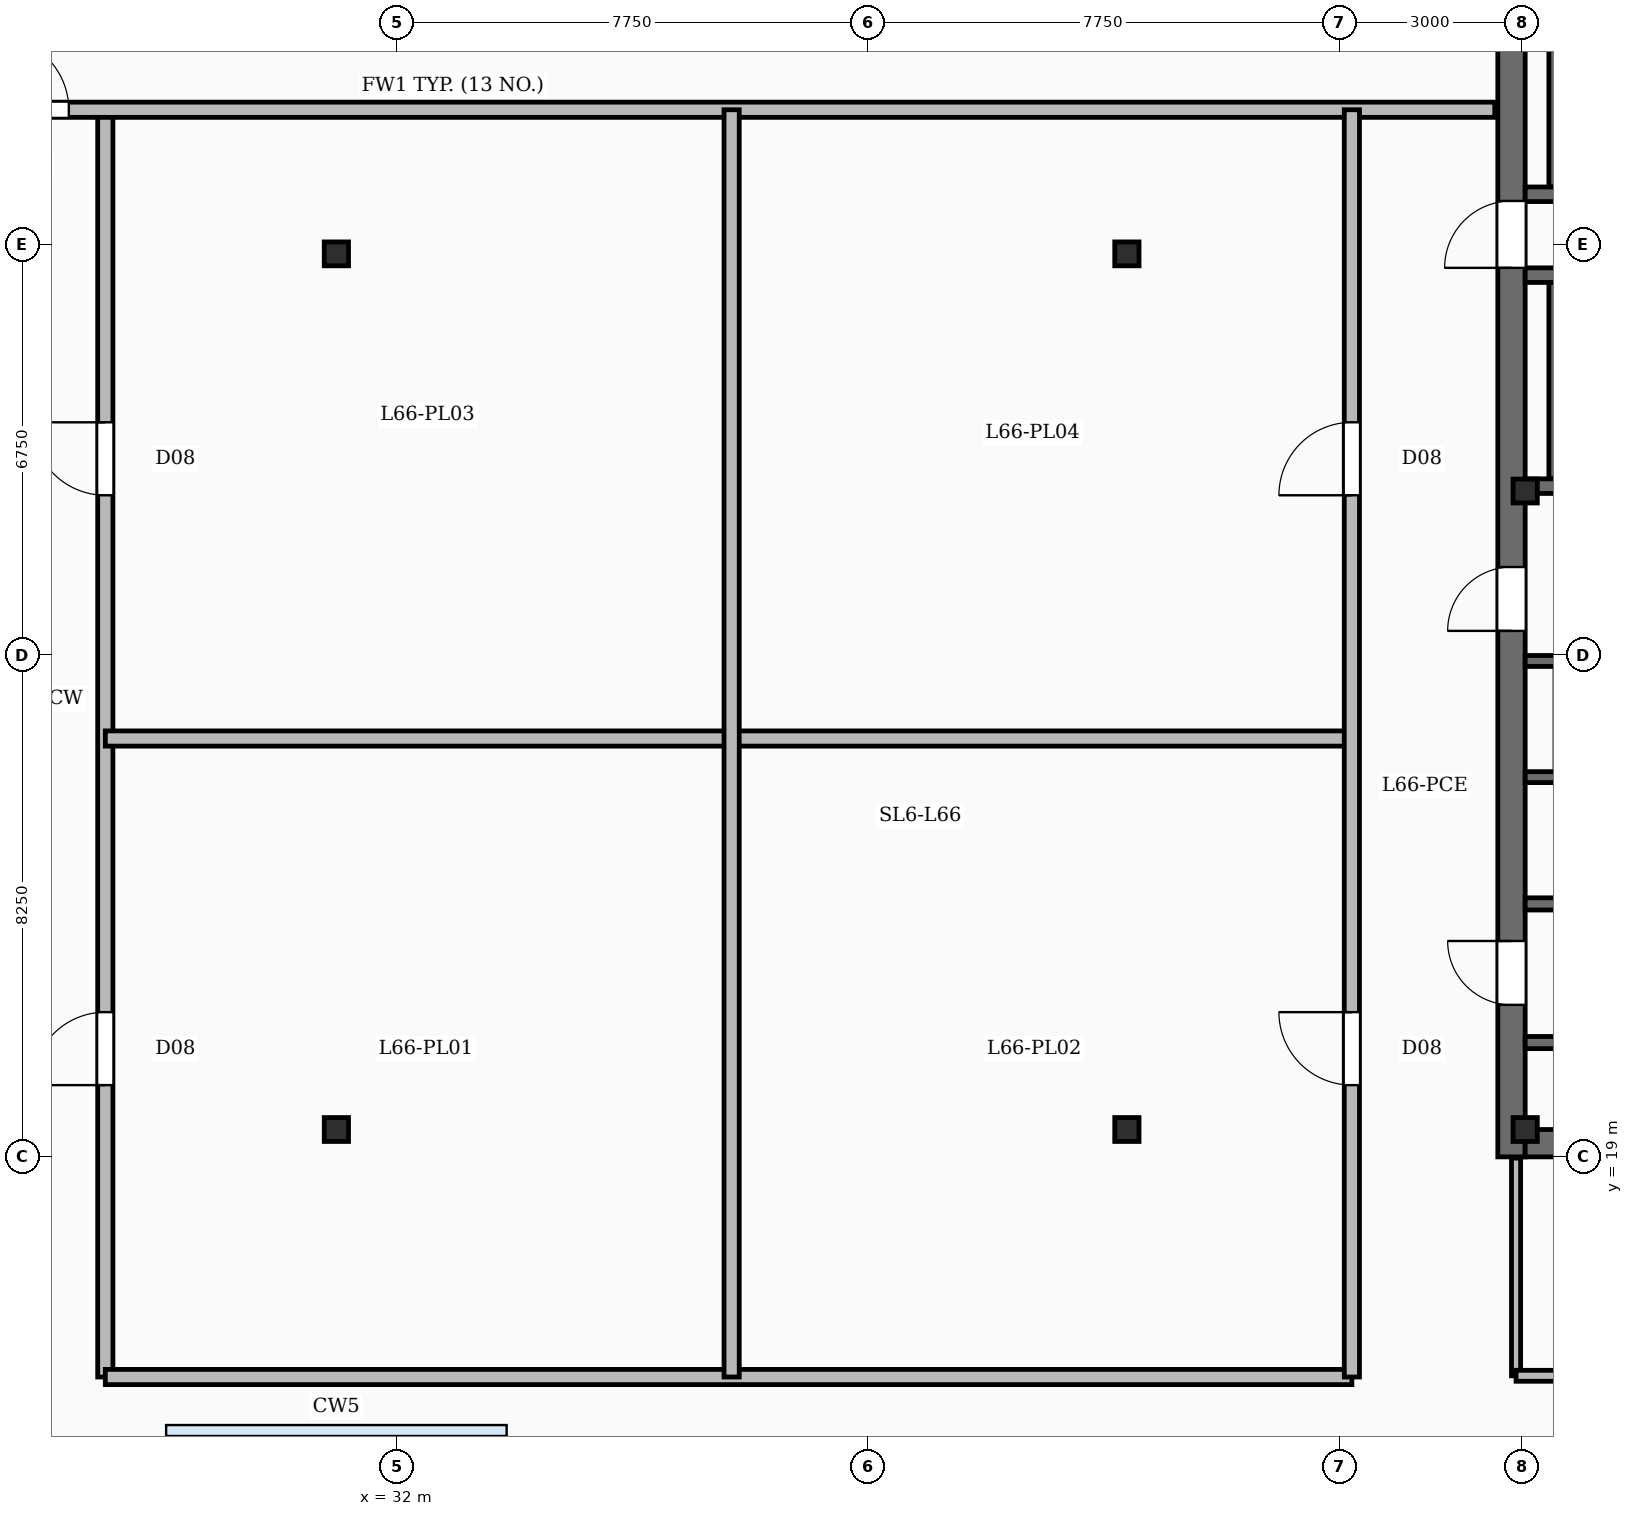
"""IFC4 building model, lengths in metres.
Left out: names, types, materials, properties, quantities, classifications, styles, units other than length and angle.
Written with IfcOpenShell. Run it as: python <this file> out.ifc"""

import sys

from ifc_helpers import new_model, si_unit, direction, frame, frame_2d, origin, origin_2d, place, context, subcontext, project, spatial, rectangle, i_section, extrude, element, fill, save


model = new_model("IFC4")
c1 = context("Model", 3, precision=1e-05, world=origin(), true_north=direction((0.0, 1.0)))
c2 = subcontext(c1, "Body", "Model", "MODEL_VIEW")
j1 = project(units=[si_unit("LENGTHUNIT", "METRE"), si_unit("PLANEANGLEUNIT", "RADIAN")], contexts=[c1])
p1 = place(None, origin())
s1 = spatial("IfcSite", under=j1, at=p1, CompositionType="ELEMENT")
p2 = place(p1, origin())
s2 = spatial("IfcBuilding", under=s1, at=p2, CompositionType="ELEMENT")
p3 = place(p2, frame((0.0, 0.0, 269.7)))
s3 = spatial("IfcBuildingStorey", under=s2, at=p3, CompositionType="ELEMENT", Elevation=269.7)
p4 = place(p3, frame((50.325, 19.0, -0.42), z_axis=(0.0, 0.0, 1.0), x_axis=(0.0, 1.0, 0.0)))
e1 = element("IfcWall", 1, at=p4, inside=s3, PredefinedType="SHEAR", context=c2, shape_type="SweptSolid", body=[
    extrude(rectangle(XDim=20.8, YDim=0.45, at=frame_2d((10.4, 0.0))), origin(), (0.0, 0.0, 1.0), 5.17),
])
p5 = place(p4, frame((2.5, 0.0, 0.42)))
e2 = element("IfcOpeningElement", 2, at=p5, cuts=e1, PredefinedType="OPENING", context=c2, shape_type="SweptSolid", body=[
    extrude(rectangle(XDim=1.05, YDim=2.15, at=frame_2d((0.525, 1.075))), frame((0.0, 0.235, 0.0), z_axis=(0.0, -1.0, 0.0), x_axis=(1.0, 0.0, 0.0)), (0.0, 0.0, 1.0), 0.47),
])
p6 = place(p4, frame((8.65, 0.0, 0.42)))
e3 = element("IfcOpeningElement", 3, at=p6, cuts=e1, PredefinedType="OPENING", context=c2, shape_type="SweptSolid", body=[
    extrude(rectangle(XDim=1.05, YDim=2.15, at=frame_2d((0.525, 1.075))), frame((0.0, 0.235, 0.0), z_axis=(0.0, -1.0, 0.0), x_axis=(1.0, 0.0, 0.0)), (0.0, 0.0, 1.0), 0.47),
])
p7 = place(p4, frame((14.62, 0.0, 0.42)))
e4 = element("IfcOpeningElement", 4, at=p7, cuts=e1, PredefinedType="OPENING", context=c2, shape_type="SweptSolid", body=[
    extrude(rectangle(XDim=1.1, YDim=2.15, at=frame_2d((0.55, 1.075))), frame((0.0, 0.235, 0.0), z_axis=(0.0, -1.0, 0.0), x_axis=(1.0, 0.0, 0.0)), (0.0, 0.0, 1.0), 0.47),
])
p8 = place(p3, frame((50.55, 19.225, -0.42), z_axis=(0.0, 0.0, 1.0), x_axis=(1.0, 0.0, 0.0)))
e5 = element("IfcWall", 5, at=p8, inside=s3, PredefinedType="SHEAR", context=c2, shape_type="SweptSolid", body=[
    extrude(rectangle(XDim=9.8, YDim=0.45, at=frame_2d((4.9, 0.0))), origin(), (0.0, 0.0, 1.0), 5.17),
])
for number, where, z_axis, x_axis in (
    (6, (50.55, 19.45, -0.42), (0.0, 0.0, 1.0), (1.0, 0.0, 0.0)),
    (7, (50.55, 29.95, -0.42), (0.0, 0.0, 1.0), (1.0, 0.0, 0.0)),
    (8, (31.0, 19.45, -0.42), (0.0, 0.0, 1.0), (1.0, 0.0, 0.0)),
    (9, (44.0, 19.45, -0.42), (0.0, 0.0, 1.0), (1.0, 0.0, 0.0)),
    (10, (31.0, 33.85, -0.42), (0.0, 0.0, 1.0), (1.0, 0.0, 0.0)),
    (11, (44.0, 33.85, -0.42), (0.0, 0.0, 1.0), (1.0, 0.0, 0.0)),
):
    element("IfcColumn", number, at=place(p3, frame(where, z_axis=z_axis, x_axis=x_axis)), inside=s3, PredefinedType="COLUMN", context=c2, shape_type="SweptSolid", body=[
        extrude(i_section(OverallWidth=0.399, OverallDepth=0.393, WebThickness=0.023, FlangeThickness=0.037, FilletRadius=0.02, at=origin_2d()), origin(), (0.0, 0.0, 1.0), 5.17),
    ])
p9 = place(p3, frame((60.35, 30.03, 0.0), z_axis=(0.0, 0.0, 1.0), x_axis=(-1.0, 0.0, 0.0)))
e12 = element("IfcWall", 12, at=p9, inside=s3, PredefinedType="SOLIDWALL", context=c2, shape_type="SweptSolid", body=[
    extrude(rectangle(XDim=9.8, YDim=0.24, at=frame_2d((4.9, 0.0))), origin(), (0.0, 0.0, 1.0), 4.75),
])
p10 = place(p9, frame((7.83, 0.0, 0.0)))
e13 = element("IfcOpeningElement", 13, at=p10, cuts=e12, PredefinedType="OPENING", context=c2, shape_type="SweptSolid", body=[
    extrude(rectangle(XDim=1.1, YDim=2.15, at=frame_2d((0.55, 1.075))), frame((0.0, 0.13, 0.0), z_axis=(0.0, -1.0, 0.0), x_axis=(1.0, 0.0, 0.0)), (0.0, 0.0, 1.0), 0.26),
])
p11 = place(p3, frame((50.55, 33.5, 0.0), z_axis=(0.0, 0.0, 1.0), x_axis=(1.0, 0.0, 0.0)))
e14 = element("IfcWall", 14, at=p11, inside=s3, PredefinedType="SOLIDWALL", context=c2, shape_type="SweptSolid", body=[
    extrude(rectangle(XDim=9.8, YDim=0.24, at=frame_2d((4.9, 0.0))), origin(), (0.0, 0.0, 1.0), 4.75),
])
p12 = place(p3, frame((51.06, 30.15, 0.0), z_axis=(0.0, 0.0, 1.0), x_axis=(0.0, 1.0, 0.0)))
e15 = element("IfcWall", 15, at=p12, inside=s3, PredefinedType="SOLIDWALL", context=c2, shape_type="SweptSolid", body=[
    extrude(rectangle(XDim=3.23, YDim=0.24, at=frame_2d((1.615, 0.0))), origin(), (0.0, 0.0, 1.0), 4.75),
])
p13 = place(p3, frame((60.35, 34.83, 0.0), z_axis=(0.0, 0.0, 1.0), x_axis=(-1.0, 0.0, 0.0)))
e16 = element("IfcWall", 16, at=p13, inside=s3, PredefinedType="SOLIDWALL", context=c2, shape_type="SweptSolid", body=[
    extrude(rectangle(XDim=9.8, YDim=0.24, at=frame_2d((4.9, 0.0))), origin(), (0.0, 0.0, 1.0), 4.75),
])
p14 = place(p13, frame((7.87, 0.0, 0.0)))
e17 = element("IfcOpeningElement", 17, at=p14, cuts=e16, PredefinedType="OPENING", context=c2, shape_type="SweptSolid", body=[
    extrude(rectangle(XDim=1.1, YDim=2.15, at=frame_2d((0.55, 1.075))), frame((0.0, 0.13, 0.0), z_axis=(0.0, -1.0, 0.0), x_axis=(1.0, 0.0, 0.0)), (0.0, 0.0, 1.0), 0.26),
])
p15 = place(p3, frame((51.06, 34.95, 0.0), z_axis=(0.0, 0.0, 1.0), x_axis=(0.0, 1.0, 0.0)))
e18 = element("IfcWall", 18, at=p15, inside=s3, PredefinedType="SOLIDWALL", context=c2, shape_type="SweptSolid", body=[
    extrude(rectangle(XDim=3.15, YDim=0.24, at=frame_2d((1.575, 0.0))), origin(), (0.0, 0.0, 1.0), 4.75),
])
p16 = place(p3, frame((50.55, 27.155, 0.0), z_axis=(0.0, 0.0, 1.0), x_axis=(1.0, 0.0, 0.0)))
e19 = element("IfcWall", 19, at=p16, inside=s3, PredefinedType="SOLIDWALL", context=c2, shape_type="SweptSolid", body=[
    extrude(rectangle(XDim=3.315, YDim=0.18, at=frame_2d((1.657, 0.0))), origin(), (0.0, 0.0, 1.0), 4.75),
])
p17 = place(p16, frame((1.235, 0.0, 0.0)))
e20 = element("IfcOpeningElement", 20, at=p17, cuts=e19, PredefinedType="OPENING", context=c2, shape_type="SweptSolid", body=[
    extrude(rectangle(XDim=1.35, YDim=2.3, at=frame_2d((0.675, 1.15))), frame((0.0, 0.1, 0.0), z_axis=(0.0, -1.0, 0.0), x_axis=(1.0, 0.0, 0.0)), (0.0, 0.0, 1.0), 0.2),
])
p18 = place(p3, frame((50.55, 25.245, 0.0), z_axis=(0.0, 0.0, 1.0), x_axis=(1.0, 0.0, 0.0)))
e21 = element("IfcWall", 21, at=p18, inside=s3, PredefinedType="SOLIDWALL", context=c2, shape_type="SweptSolid", body=[
    extrude(rectangle(XDim=3.315, YDim=0.18, at=frame_2d((1.657, 0.0))), origin(), (0.0, 0.0, 1.0), 4.75),
])
p19 = place(p3, frame((50.55, 20.88, 0.0), z_axis=(0.0, 0.0, 1.0), x_axis=(1.0, 0.0, 0.0)))
e22 = element("IfcWall", 22, at=p19, inside=s3, PredefinedType="SOLIDWALL", context=c2, shape_type="SweptSolid", body=[
    extrude(rectangle(XDim=9.8, YDim=0.2, at=frame_2d((4.9, 0.0))), origin(), (0.0, 0.0, 1.0), 3.81),
])
p20 = place(p19, frame((1.4, 0.0, 0.0)))
e23 = element("IfcOpeningElement", 23, at=p20, cuts=e22, PredefinedType="OPENING", context=c2, shape_type="SweptSolid", body=[
    extrude(rectangle(XDim=1.05, YDim=2.15, at=frame_2d((0.525, 1.075))), frame((0.0, 0.11, 0.0), z_axis=(0.0, -1.0, 0.0), x_axis=(1.0, 0.0, 0.0)), (0.0, 0.0, 1.0), 0.22),
])
p21 = place(p19, frame((5.5, 0.0, 0.0)))
e24 = element("IfcOpeningElement", 24, at=p21, cuts=e22, PredefinedType="OPENING", context=c2, shape_type="SweptSolid", body=[
    extrude(rectangle(XDim=1.05, YDim=2.15, at=frame_2d((0.525, 1.075))), frame((0.0, 0.11, 0.0), z_axis=(0.0, -1.0, 0.0), x_axis=(1.0, 0.0, 0.0)), (0.0, 0.0, 1.0), 0.22),
])
p22 = place(p3, frame((50.55, 23.16, 0.0), z_axis=(0.0, 0.0, 1.0), x_axis=(1.0, 0.0, 0.0)))
e25 = element("IfcWall", 25, at=p22, inside=s3, PredefinedType="SOLIDWALL", context=c2, shape_type="SweptSolid", body=[
    extrude(rectangle(XDim=3.33, YDim=0.2, at=frame_2d((1.665, 0.0))), origin(), (0.0, 0.0, 1.0), 3.81),
])
p23 = place(p22, frame((0.55, 0.0, 0.0)))
e26 = element("IfcOpeningElement", 26, at=p23, cuts=e25, PredefinedType="OPENING", context=c2, shape_type="SweptSolid", body=[
    extrude(rectangle(XDim=0.86, YDim=2.05, at=frame_2d((0.43, 1.025))), frame((0.0, 0.11, 0.0), z_axis=(0.0, -1.0, 0.0), x_axis=(1.0, 0.0, 0.0)), (0.0, 0.0, 1.0), 0.22),
])
p24 = place(p3, frame((50.4, 15.4, 0.0), z_axis=(0.0, 0.0, 1.0), x_axis=(1.0, 0.0, 0.0)))
e27 = element("IfcWall", 27, at=p24, inside=s3, PredefinedType="SOLIDWALL", context=c2, shape_type="SweptSolid", body=[
    extrude(rectangle(XDim=10.0, YDim=0.18, at=frame_2d((5.0, 0.0))), origin(), (0.0, 0.0, 1.0), 3.81),
])
p25 = place(p24, frame((1.19, 0.0, 0.0)))
e28 = element("IfcOpeningElement", 28, at=p25, cuts=e27, PredefinedType="OPENING", context=c2, shape_type="SweptSolid", body=[
    extrude(rectangle(XDim=0.92, YDim=2.1, at=frame_2d((0.46, 1.05))), frame((0.0, 0.1, 0.0), z_axis=(0.0, -1.0, 0.0), x_axis=(1.0, 0.0, 0.0)), (0.0, 0.0, 1.0), 0.2),
])
p26 = place(p24, frame((4.54, 0.0, 0.0)))
e29 = element("IfcOpeningElement", 29, at=p26, cuts=e27, PredefinedType="OPENING", context=c2, shape_type="SweptSolid", body=[
    extrude(rectangle(XDim=0.92, YDim=2.1, at=frame_2d((0.46, 1.05))), frame((0.0, 0.1, 0.0), z_axis=(0.0, -1.0, 0.0), x_axis=(1.0, 0.0, 0.0)), (0.0, 0.0, 1.0), 0.2),
])
p27 = place(p24, frame((7.92, 0.0, 0.0)))
e30 = element("IfcOpeningElement", 30, at=p27, cuts=e27, PredefinedType="OPENING", context=c2, shape_type="SweptSolid", body=[
    extrude(rectangle(XDim=0.86, YDim=2.05, at=frame_2d((0.43, 1.025))), frame((0.0, 0.1, 0.0), z_axis=(0.0, -1.0, 0.0), x_axis=(1.0, 0.0, 0.0)), (0.0, 0.0, 1.0), 0.2),
])
p28 = place(p3, frame((50.4, 15.4, 0.0), z_axis=(0.0, 0.0, 1.0), x_axis=(0.0, 1.0, 0.0)))
e31 = element("IfcWall", 31, at=p28, inside=s3, PredefinedType="PARTITIONING", context=c2, shape_type="SweptSolid", body=[
    extrude(rectangle(XDim=3.58, YDim=0.15, at=frame_2d((1.79, 0.0))), origin(), (0.0, 0.0, 1.0), 2.8),
])
p29 = place(p3, frame((37.5, 15.38, 0.0), z_axis=(0.0, 0.0, 1.0), x_axis=(0.0, 1.0, 0.0)))
e32 = element("IfcWall", 32, at=p29, inside=s3, PredefinedType="SOLIDWALL", context=c2, shape_type="SweptSolid", body=[
    extrude(rectangle(XDim=20.84, YDim=0.25, at=frame_2d((10.42, 0.0))), origin(), (0.0, 0.0, 1.0), 3.81),
])
for number, where, z_axis, x_axis in (
    (33, (27.2, 25.88, 0.0), (0.0, 0.0, 1.0), (1.0, 0.0, 0.0)),
    (34, (27.2, 15.38, 0.0), (0.0, 0.0, 1.0), (1.0, 0.0, 0.0)),
):
    element("IfcWall", number, at=place(p3, frame(where, z_axis=z_axis, x_axis=x_axis)), inside=s3, PredefinedType="SOLIDWALL", context=c2, shape_type="SweptSolid", body=[
        extrude(rectangle(XDim=20.5, YDim=0.25, at=frame_2d((10.25, 0.0))), origin(), (0.0, 0.0, 1.0), 3.81),
    ])
p30 = place(p3, frame((24.85, 36.22, 0.0), z_axis=(0.0, 0.0, 1.0), x_axis=(1.0, 0.0, 0.0)))
e35 = element("IfcWall", 35, at=p30, inside=s3, PredefinedType="SOLIDWALL", context=c2, shape_type="SweptSolid", body=[
    extrude(rectangle(XDim=25.2, YDim=0.25, at=frame_2d((12.6, 0.0))), origin(), (0.0, 0.0, 1.0), 3.81),
])
p31 = place(p30, frame((0.55, 0.0, 0.0)))
e36 = element("IfcOpeningElement", 36, at=p31, cuts=e35, PredefinedType="OPENING", context=c2, shape_type="SweptSolid", body=[
    extrude(rectangle(XDim=1.2, YDim=2.2, at=frame_2d((0.6, 1.1))), frame((0.0, 0.135, 0.0), z_axis=(0.0, -1.0, 0.0), x_axis=(1.0, 0.0, 0.0)), (0.0, 0.0, 1.0), 0.27),
])
p32 = place(p3, frame((27.2, 15.38, 0.0), z_axis=(0.0, 0.0, 1.0), x_axis=(0.0, 1.0, 0.0)))
e37 = element("IfcWall", 37, at=p32, inside=s3, PredefinedType="SOLIDWALL", context=c2, shape_type="SweptSolid", body=[
    extrude(rectangle(XDim=20.84, YDim=0.25, at=frame_2d((10.42, 0.0))), origin(), (0.0, 0.0, 1.0), 3.81),
])
p33 = place(p32, frame((4.8, 0.0, 0.0)))
e38 = element("IfcOpeningElement", 38, at=p33, cuts=e37, PredefinedType="OPENING", context=c2, shape_type="SweptSolid", body=[
    extrude(rectangle(XDim=1.2, YDim=2.2, at=frame_2d((0.6, 1.1))), frame((0.0, 0.135, 0.0), z_axis=(0.0, -1.0, 0.0), x_axis=(1.0, 0.0, 0.0)), (0.0, 0.0, 1.0), 0.27),
])
p34 = place(p32, frame((14.5, 0.0, 0.0)))
e39 = element("IfcOpeningElement", 39, at=p34, cuts=e37, PredefinedType="OPENING", context=c2, shape_type="SweptSolid", body=[
    extrude(rectangle(XDim=1.2, YDim=2.2, at=frame_2d((0.6, 1.1))), frame((0.0, 0.135, 0.0), z_axis=(0.0, -1.0, 0.0), x_axis=(1.0, 0.0, 0.0)), (0.0, 0.0, 1.0), 0.27),
])
p35 = place(p3, frame((47.7, 15.38, 0.0), z_axis=(0.0, 0.0, 1.0), x_axis=(0.0, 1.0, 0.0)))
e40 = element("IfcWall", 40, at=p35, inside=s3, PredefinedType="SOLIDWALL", context=c2, shape_type="SweptSolid", body=[
    extrude(rectangle(XDim=20.84, YDim=0.25, at=frame_2d((10.42, 0.0))), origin(), (0.0, 0.0, 1.0), 3.81),
])
p36 = place(p35, frame((4.8, 0.0, 0.0)))
e41 = element("IfcOpeningElement", 41, at=p36, cuts=e40, PredefinedType="OPENING", context=c2, shape_type="SweptSolid", body=[
    extrude(rectangle(XDim=1.2, YDim=2.2, at=frame_2d((0.6, 1.1))), frame((0.0, 0.135, 0.0), z_axis=(0.0, -1.0, 0.0), x_axis=(1.0, 0.0, 0.0)), (0.0, 0.0, 1.0), 0.27),
])
p37 = place(p35, frame((14.5, 0.0, 0.0)))
e42 = element("IfcOpeningElement", 42, at=p37, cuts=e40, PredefinedType="OPENING", context=c2, shape_type="SweptSolid", body=[
    extrude(rectangle(XDim=1.2, YDim=2.2, at=frame_2d((0.6, 1.1))), frame((0.0, 0.135, 0.0), z_axis=(0.0, -1.0, 0.0), x_axis=(1.0, 0.0, 0.0)), (0.0, 0.0, 1.0), 0.27),
])
p38 = place(p5, origin())
e43 = element("IfcDoor", 43, at=p38, inside=s3, OperationType="SINGLE_SWING_RIGHT", PredefinedType="DOOR", context=c2, shape_type="SweptSolid", body=[
    extrude(rectangle(XDim=1.05, YDim=2.15, at=frame_2d((0.525, 1.075))), frame((0.0, 0.025, 0.0), z_axis=(0.0, -1.0, 0.0), x_axis=(1.0, 0.0, 0.0)), (0.0, 0.0, 1.0), 0.05),
])
fill(e2, e43)
p39 = place(p6, origin())
e44 = element("IfcDoor", 44, at=p39, inside=s3, OperationType="SINGLE_SWING_LEFT", PredefinedType="DOOR", context=c2, shape_type="SweptSolid", body=[
    extrude(rectangle(XDim=1.05, YDim=2.15, at=frame_2d((0.525, 1.075))), frame((0.0, 0.025, 0.0), z_axis=(0.0, -1.0, 0.0), x_axis=(1.0, 0.0, 0.0)), (0.0, 0.0, 1.0), 0.05),
])
fill(e3, e44)
p40 = place(p7, origin())
e45 = element("IfcDoor", 45, at=p40, inside=s3, OperationType="SINGLE_SWING_LEFT", PredefinedType="DOOR", context=c2, shape_type="SweptSolid", body=[
    extrude(rectangle(XDim=1.1, YDim=2.15, at=frame_2d((0.55, 1.075))), frame((0.0, 0.025, 0.0), z_axis=(0.0, -1.0, 0.0), x_axis=(1.0, 0.0, 0.0)), (0.0, 0.0, 1.0), 0.05),
])
fill(e4, e45)
p41 = place(p31, origin())
e46 = element("IfcDoor", 46, at=p41, inside=s3, OperationType="SINGLE_SWING_LEFT", PredefinedType="DOOR", context=c2, shape_type="SweptSolid", body=[
    extrude(rectangle(XDim=1.2, YDim=2.2, at=frame_2d((0.6, 1.1))), frame((0.0, 0.025, 0.0), z_axis=(0.0, -1.0, 0.0), x_axis=(1.0, 0.0, 0.0)), (0.0, 0.0, 1.0), 0.05),
])
fill(e36, e46)
p42 = place(p33, origin())
e47 = element("IfcDoor", 47, at=p42, inside=s3, OperationType="SINGLE_SWING_LEFT", PredefinedType="DOOR", context=c2, shape_type="SweptSolid", body=[
    extrude(rectangle(XDim=1.2, YDim=2.2, at=frame_2d((0.6, 1.1))), frame((0.0, 0.025, 0.0), z_axis=(0.0, -1.0, 0.0), x_axis=(1.0, 0.0, 0.0)), (0.0, 0.0, 1.0), 0.05),
])
fill(e38, e47)
p43 = place(p34, origin())
e48 = element("IfcDoor", 48, at=p43, inside=s3, OperationType="SINGLE_SWING_RIGHT", PredefinedType="DOOR", context=c2, shape_type="SweptSolid", body=[
    extrude(rectangle(XDim=1.2, YDim=2.2, at=frame_2d((0.6, 1.1))), frame((0.0, 0.025, 0.0), z_axis=(0.0, -1.0, 0.0), x_axis=(1.0, 0.0, 0.0)), (0.0, 0.0, 1.0), 0.05),
])
fill(e39, e48)
p44 = place(p36, origin())
e49 = element("IfcDoor", 49, at=p44, inside=s3, OperationType="SINGLE_SWING_RIGHT", PredefinedType="DOOR", context=c2, shape_type="SweptSolid", body=[
    extrude(rectangle(XDim=1.2, YDim=2.2, at=frame_2d((0.6, 1.1))), frame((0.0, 0.025, 0.0), z_axis=(0.0, -1.0, 0.0), x_axis=(1.0, 0.0, 0.0)), (0.0, 0.0, 1.0), 0.05),
])
fill(e41, e49)
p45 = place(p37, origin())
e50 = element("IfcDoor", 50, at=p45, inside=s3, OperationType="SINGLE_SWING_LEFT", PredefinedType="DOOR", context=c2, shape_type="SweptSolid", body=[
    extrude(rectangle(XDim=1.2, YDim=2.2, at=frame_2d((0.6, 1.1))), frame((0.0, 0.025, 0.0), z_axis=(0.0, -1.0, 0.0), x_axis=(1.0, 0.0, 0.0)), (0.0, 0.0, 1.0), 0.05),
])
fill(e42, e50)
save(model, sys.argv[1])
